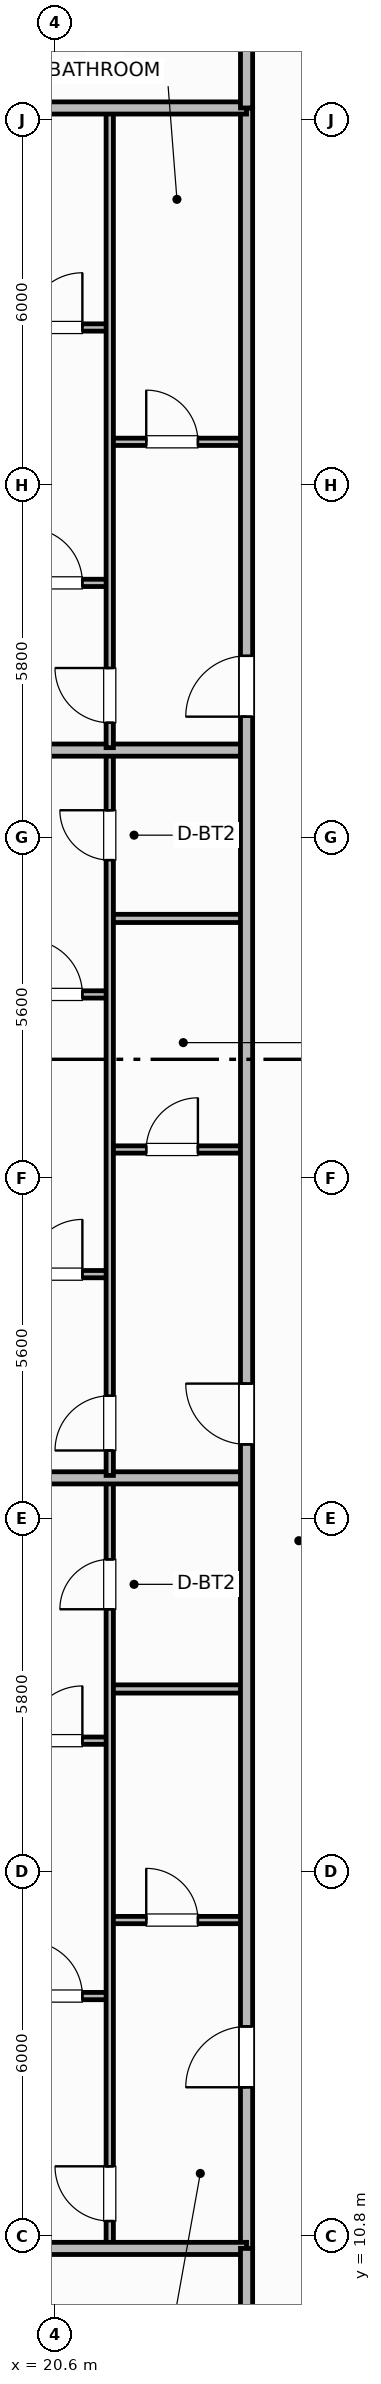
"""IFC4 building model, lengths in metres.
Left out: names, types, materials, properties, quantities, classifications, styles, units other than length and angle.
Written with IfcOpenShell. Run it as: python <this file> out.ifc"""

import sys

from ifc_helpers import new_model, si_unit, direction, frame, frame_2d, origin, place, context, subcontext, project, spatial, rectangle, extrude, element, fill, save


model = new_model("IFC4")
c1 = context("Model", 3, precision=1e-05, world=origin(), true_north=direction((0.0, 1.0)))
c2 = subcontext(c1, "Body", "Model", "MODEL_VIEW")
j1 = project(units=[si_unit("LENGTHUNIT", "METRE"), si_unit("PLANEANGLEUNIT", "RADIAN")], contexts=[c1])
p1 = place(None, origin())
s1 = spatial("IfcSite", under=j1, at=p1, CompositionType="ELEMENT")
p2 = place(p1, origin())
s2 = spatial("IfcBuilding", under=s1, at=p2, CompositionType="ELEMENT")
p3 = place(p2, frame((0.0, 0.0, 69.5)))
s3 = spatial("IfcBuildingStorey", under=s2, at=p3, CompositionType="ELEMENT", Elevation=69.5)
p4 = place(p3, frame((21.5, 16.0, 0.0), z_axis=(0.0, 0.0, 1.0), x_axis=(1.0, 0.0, 0.0)))
e1 = element("IfcWall", 1, at=p4, inside=s3, PredefinedType="PARTITIONING", context=c2, shape_type="SweptSolid", body=[
    extrude(rectangle(XDim=2.25, YDim=0.12, at=frame_2d((1.125, 0.0))), origin(), (0.0, 0.0, 1.0), 2.53),
])
p5 = place(p4, frame((0.6, 0.0, 0.0)))
e2 = element("IfcOpeningElement", 2, at=p5, cuts=e1, PredefinedType="OPENING", context=c2, shape_type="SweptSolid", body=[
    extrude(rectangle(XDim=0.85, YDim=2.1, at=frame_2d((0.425, 1.05))), frame((0.0, 0.07, 0.0), z_axis=(0.0, -1.0, 0.0), x_axis=(1.0, 0.0, 0.0)), (0.0, 0.0, 1.0), 0.14),
])
p6 = place(p3, frame((21.5, 19.8, 0.0), z_axis=(0.0, 0.0, 1.0), x_axis=(1.0, 0.0, 0.0)))
e3 = element("IfcWall", 3, at=p6, inside=s3, PredefinedType="PARTITIONING", context=c2, shape_type="SweptSolid", body=[
    extrude(rectangle(XDim=2.25, YDim=0.135, at=frame_2d((1.125, 0.0))), origin(), (0.0, 0.0, 1.0), 2.53),
])
p7 = place(p3, frame((14.57, 14.75, 0.0), z_axis=(0.0, 0.0, 1.0), x_axis=(1.0, 0.0, 0.0)))
e4 = element("IfcWall", 4, at=p7, inside=s3, PredefinedType="PARTITIONING", context=c2, shape_type="SweptSolid", body=[
    extrude(rectangle(XDim=6.93, YDim=0.12, at=frame_2d((3.465, 0.0))), origin(), (0.0, 0.0, 1.0), 2.53),
])
p8 = place(p7, frame((5.58, 0.0, 0.0)))
e5 = element("IfcOpeningElement", 5, at=p8, cuts=e4, PredefinedType="OPENING", context=c2, shape_type="SweptSolid", body=[
    extrude(rectangle(XDim=0.9, YDim=2.1, at=frame_2d((0.45, 1.05))), frame((0.0, 0.07, 0.0), z_axis=(0.0, -1.0, 0.0), x_axis=(1.0, 0.0, 0.0)), (0.0, 0.0, 1.0), 0.14),
])
p9 = place(p3, frame((14.57, 18.95, 0.0), z_axis=(0.0, 0.0, 1.0), x_axis=(1.0, 0.0, 0.0)))
e6 = element("IfcWall", 6, at=p9, inside=s3, PredefinedType="PARTITIONING", context=c2, shape_type="SweptSolid", body=[
    extrude(rectangle(XDim=6.93, YDim=0.12, at=frame_2d((3.465, 0.0))), origin(), (0.0, 0.0, 1.0), 2.53),
])
p10 = place(p9, frame((5.58, 0.0, 0.0)))
e7 = element("IfcOpeningElement", 7, at=p10, cuts=e6, PredefinedType="OPENING", context=c2, shape_type="SweptSolid", body=[
    extrude(rectangle(XDim=0.9, YDim=2.1, at=frame_2d((0.45, 1.05))), frame((0.0, 0.07, 0.0), z_axis=(0.0, -1.0, 0.0), x_axis=(1.0, 0.0, 0.0)), (0.0, 0.0, 1.0), 0.14),
])
p11 = place(p3, frame((21.5, 10.64, 0.0), z_axis=(0.0, 0.0, 1.0), x_axis=(0.0, 1.0, 0.0)))
e8 = element("IfcWall", 8, at=p11, inside=s3, PredefinedType="PARTITIONING", context=c2, shape_type="SweptSolid", body=[
    extrude(rectangle(XDim=12.592, YDim=0.12, at=frame_2d((6.296, 0.0))), origin(), (0.0, 0.0, 1.0), 2.53),
])
p12 = place(p11, frame((0.41, 0.0, 0.0)))
e9 = element("IfcOpeningElement", 9, at=p12, cuts=e8, PredefinedType="OPENING", context=c2, shape_type="SweptSolid", body=[
    extrude(rectangle(XDim=0.9, YDim=2.1, at=frame_2d((0.45, 1.05))), frame((0.0, 0.07, 0.0), z_axis=(0.0, -1.0, 0.0), x_axis=(1.0, 0.0, 0.0)), (0.0, 0.0, 1.0), 0.14),
])
p13 = place(p11, frame((10.471, 0.0, 0.0)))
e10 = element("IfcOpeningElement", 10, at=p13, cuts=e8, PredefinedType="OPENING", context=c2, shape_type="SweptSolid", body=[
    extrude(rectangle(XDim=0.82, YDim=2.08, at=frame_2d((0.41, 1.04))), frame((0.0, 0.07, 0.0), z_axis=(0.0, -1.0, 0.0), x_axis=(1.0, 0.0, 0.0)), (0.0, 0.0, 1.0), 0.14),
])
p14 = place(p3, frame((14.57, 23.272, 0.0), z_axis=(0.0, 0.0, 1.0), x_axis=(1.0, 0.0, 0.0)))
e11 = element("IfcWall", 11, at=p14, inside=s3, PredefinedType="PARTITIONING", context=c2, shape_type="SweptSolid", body=[
    extrude(rectangle(XDim=9.18, YDim=0.2, at=frame_2d((4.59, 0.0))), origin(), (0.0, 0.0, 1.0), 2.53),
])
p15 = place(p3, frame((21.5, 28.672, 0.0), z_axis=(0.0, 0.0, 1.0), x_axis=(1.0, 0.0, 0.0)))
e12 = element("IfcWall", 12, at=p15, inside=s3, PredefinedType="PARTITIONING", context=c2, shape_type="SweptSolid", body=[
    extrude(rectangle(XDim=2.25, YDim=0.12, at=frame_2d((1.125, 0.0))), origin(), (0.0, 0.0, 1.0), 2.53),
])
p16 = place(p15, frame((0.6, 0.0, 0.0)))
e13 = element("IfcOpeningElement", 13, at=p16, cuts=e12, PredefinedType="OPENING", context=c2, shape_type="SweptSolid", body=[
    extrude(rectangle(XDim=0.85, YDim=2.1, at=frame_2d((0.425, 1.05))), frame((0.0, 0.07, 0.0), z_axis=(0.0, -1.0, 0.0), x_axis=(1.0, 0.0, 0.0)), (0.0, 0.0, 1.0), 0.14),
])
p17 = place(p3, frame((21.5, 32.472, 0.0), z_axis=(0.0, 0.0, 1.0), x_axis=(1.0, 0.0, 0.0)))
e14 = element("IfcWall", 14, at=p17, inside=s3, PredefinedType="PARTITIONING", context=c2, shape_type="SweptSolid", body=[
    extrude(rectangle(XDim=2.25, YDim=0.135, at=frame_2d((1.125, 0.0))), origin(), (0.0, 0.0, 1.0), 2.53),
])
p18 = place(p3, frame((15.181, 26.622, 0.0), z_axis=(0.0, 0.0, 1.0), x_axis=(1.0, 0.0, 0.0)))
e15 = element("IfcWall", 15, at=p18, inside=s3, PredefinedType="PARTITIONING", context=c2, shape_type="SweptSolid", body=[
    extrude(rectangle(XDim=6.319, YDim=0.12, at=frame_2d((3.159, 0.0))), origin(), (0.0, 0.0, 1.0), 2.53),
])
p19 = place(p18, frame((4.969, 0.0, 0.0)))
e16 = element("IfcOpeningElement", 16, at=p19, cuts=e15, PredefinedType="OPENING", context=c2, shape_type="SweptSolid", body=[
    extrude(rectangle(XDim=0.9, YDim=2.1, at=frame_2d((0.45, 1.05))), frame((0.0, 0.07, 0.0), z_axis=(0.0, -1.0, 0.0), x_axis=(1.0, 0.0, 0.0)), (0.0, 0.0, 1.0), 0.14),
])
p20 = place(p3, frame((15.259, 31.222, 0.0), z_axis=(0.0, 0.0, 1.0), x_axis=(1.0, 0.0, 0.0)))
e17 = element("IfcWall", 17, at=p20, inside=s3, PredefinedType="PARTITIONING", context=c2, shape_type="SweptSolid", body=[
    extrude(rectangle(XDim=6.241, YDim=0.12, at=frame_2d((3.121, 0.0))), origin(), (0.0, 0.0, 1.0), 2.53),
])
p21 = place(p20, frame((4.891, 0.0, 0.0)))
e18 = element("IfcOpeningElement", 18, at=p21, cuts=e17, PredefinedType="OPENING", context=c2, shape_type="SweptSolid", body=[
    extrude(rectangle(XDim=0.9, YDim=2.1, at=frame_2d((0.45, 1.05))), frame((0.0, 0.07, 0.0), z_axis=(0.0, -1.0, 0.0), x_axis=(1.0, 0.0, 0.0)), (0.0, 0.0, 1.0), 0.14),
])
p22 = place(p3, frame((21.5, 23.312, 0.0), z_axis=(0.0, 0.0, 1.0), x_axis=(0.0, 1.0, 0.0)))
e19 = element("IfcWall", 19, at=p22, inside=s3, PredefinedType="PARTITIONING", context=c2, shape_type="SweptSolid", body=[
    extrude(rectangle(XDim=11.888, YDim=0.12, at=frame_2d((5.944, 0.0))), origin(), (0.0, 0.0, 1.0), 2.53),
])
p23 = place(p22, frame((0.41, 0.0, 0.0)))
e20 = element("IfcOpeningElement", 20, at=p23, cuts=e19, PredefinedType="OPENING", context=c2, shape_type="SweptSolid", body=[
    extrude(rectangle(XDim=0.9, YDim=2.1, at=frame_2d((0.45, 1.05))), frame((0.0, 0.07, 0.0), z_axis=(0.0, -1.0, 0.0), x_axis=(1.0, 0.0, 0.0)), (0.0, 0.0, 1.0), 0.14),
])
p24 = place(p22, frame((10.119, 0.0, 0.0)))
e21 = element("IfcOpeningElement", 21, at=p24, cuts=e19, PredefinedType="OPENING", context=c2, shape_type="SweptSolid", body=[
    extrude(rectangle(XDim=0.82, YDim=2.08, at=frame_2d((0.41, 1.04))), frame((0.0, 0.07, 0.0), z_axis=(0.0, -1.0, 0.0), x_axis=(1.0, 0.0, 0.0)), (0.0, 0.0, 1.0), 0.14),
])
p25 = place(p3, frame((14.57, 35.24, 0.0), z_axis=(0.0, 0.0, 1.0), x_axis=(1.0, 0.0, 0.0)))
e22 = element("IfcWall", 22, at=p25, inside=s3, PredefinedType="PARTITIONING", context=c2, shape_type="SweptSolid", body=[
    extrude(rectangle(XDim=9.18, YDim=0.2, at=frame_2d((4.59, 0.0))), origin(), (0.0, 0.0, 1.0), 2.53),
])
p26 = place(p3, frame((21.5, 40.31, 0.0), z_axis=(0.0, 0.0, 1.0), x_axis=(1.0, 0.0, 0.0)))
e23 = element("IfcWall", 23, at=p26, inside=s3, PredefinedType="PARTITIONING", context=c2, shape_type="SweptSolid", body=[
    extrude(rectangle(XDim=2.25, YDim=0.12, at=frame_2d((1.125, 0.0))), origin(), (0.0, 0.0, 1.0), 2.53),
])
p27 = place(p26, frame((0.6, 0.0, 0.0)))
e24 = element("IfcOpeningElement", 24, at=p27, cuts=e23, PredefinedType="OPENING", context=c2, shape_type="SweptSolid", body=[
    extrude(rectangle(XDim=0.85, YDim=2.1, at=frame_2d((0.425, 1.05))), frame((0.0, 0.07, 0.0), z_axis=(0.0, -1.0, 0.0), x_axis=(1.0, 0.0, 0.0)), (0.0, 0.0, 1.0), 0.14),
])
p28 = place(p3, frame((14.57, 37.99, 0.0), z_axis=(0.0, 0.0, 1.0), x_axis=(1.0, 0.0, 0.0)))
e25 = element("IfcWall", 25, at=p28, inside=s3, PredefinedType="PARTITIONING", context=c2, shape_type="SweptSolid", body=[
    extrude(rectangle(XDim=6.93, YDim=0.12, at=frame_2d((3.465, 0.0))), origin(), (0.0, 0.0, 1.0), 2.53),
])
p29 = place(p28, frame((5.58, 0.0, 0.0)))
e26 = element("IfcOpeningElement", 26, at=p29, cuts=e25, PredefinedType="OPENING", context=c2, shape_type="SweptSolid", body=[
    extrude(rectangle(XDim=0.9, YDim=2.1, at=frame_2d((0.45, 1.05))), frame((0.0, 0.07, 0.0), z_axis=(0.0, -1.0, 0.0), x_axis=(1.0, 0.0, 0.0)), (0.0, 0.0, 1.0), 0.14),
])
p30 = place(p3, frame((14.57, 42.19, 0.0), z_axis=(0.0, 0.0, 1.0), x_axis=(1.0, 0.0, 0.0)))
e27 = element("IfcWall", 27, at=p30, inside=s3, PredefinedType="PARTITIONING", context=c2, shape_type="SweptSolid", body=[
    extrude(rectangle(XDim=6.93, YDim=0.12, at=frame_2d((3.465, 0.0))), origin(), (0.0, 0.0, 1.0), 2.53),
])
p31 = place(p30, frame((5.58, 0.0, 0.0)))
e28 = element("IfcOpeningElement", 28, at=p31, cuts=e27, PredefinedType="OPENING", context=c2, shape_type="SweptSolid", body=[
    extrude(rectangle(XDim=0.9, YDim=2.1, at=frame_2d((0.45, 1.05))), frame((0.0, 0.07, 0.0), z_axis=(0.0, -1.0, 0.0), x_axis=(1.0, 0.0, 0.0)), (0.0, 0.0, 1.0), 0.14),
])
p32 = place(p3, frame((21.5, 35.28, 0.0), z_axis=(0.0, 0.0, 1.0), x_axis=(0.0, 1.0, 0.0)))
e29 = element("IfcWall", 29, at=p32, inside=s3, PredefinedType="PARTITIONING", context=c2, shape_type="SweptSolid", body=[
    extrude(rectangle(XDim=10.48, YDim=0.12, at=frame_2d((5.24, 0.0))), origin(), (0.0, 0.0, 1.0), 2.53),
])
p33 = place(p32, frame((0.41, 0.0, 0.0)))
e30 = element("IfcOpeningElement", 30, at=p33, cuts=e29, PredefinedType="OPENING", context=c2, shape_type="SweptSolid", body=[
    extrude(rectangle(XDim=0.9, YDim=2.1, at=frame_2d((0.45, 1.05))), frame((0.0, 0.07, 0.0), z_axis=(0.0, -1.0, 0.0), x_axis=(1.0, 0.0, 0.0)), (0.0, 0.0, 1.0), 0.14),
])
p34 = place(p3, frame((23.75, 10.6, 0.0), z_axis=(0.0, 0.0, 1.0), x_axis=(0.0, 1.0, 0.0)))
e31 = element("IfcWall", 31, at=p34, inside=s3, PredefinedType="PARTITIONING", context=c2, shape_type="SweptSolid", body=[
    extrude(rectangle(XDim=35.2, YDim=0.2, at=frame_2d((17.6, 0.0))), origin(), (0.0, 0.0, 1.0), 2.53),
])
p35 = place(p34, frame((2.65, 0.0, 0.0)))
e32 = element("IfcOpeningElement", 32, at=p35, cuts=e31, PredefinedType="OPENING", context=c2, shape_type="SweptSolid", body=[
    extrude(rectangle(XDim=1.0, YDim=2.15, at=frame_2d((0.5, 1.075))), frame((0.0, 0.11, 0.0), z_axis=(0.0, -1.0, 0.0), x_axis=(1.0, 0.0, 0.0)), (0.0, 0.0, 1.0), 0.22),
])
p36 = place(p34, frame((13.222, 0.0, 0.0)))
e33 = element("IfcOpeningElement", 33, at=p36, cuts=e31, PredefinedType="OPENING", context=c2, shape_type="SweptSolid", body=[
    extrude(rectangle(XDim=1.0, YDim=2.15, at=frame_2d((0.5, 1.075))), frame((0.0, 0.11, 0.0), z_axis=(0.0, -1.0, 0.0), x_axis=(1.0, 0.0, 0.0)), (0.0, 0.0, 1.0), 0.22),
])
p37 = place(p34, frame((25.19, 0.0, 0.0)))
e34 = element("IfcOpeningElement", 34, at=p37, cuts=e31, PredefinedType="OPENING", context=c2, shape_type="SweptSolid", body=[
    extrude(rectangle(XDim=1.0, YDim=2.15, at=frame_2d((0.5, 1.075))), frame((0.0, 0.11, 0.0), z_axis=(0.0, -1.0, 0.0), x_axis=(1.0, 0.0, 0.0)), (0.0, 0.0, 1.0), 0.22),
])
for number, where, z_axis, x_axis in (
    (35, (14.99, 10.6, 0.0), (0.0, 0.0, 1.0), (1.0, 0.0, 0.0)),
    (36, (14.99, 45.8, 0.0), (0.0, 0.0, 1.0), (1.0, 0.0, 0.0)),
):
    element("IfcWall", number, at=place(p3, frame(where, z_axis=z_axis, x_axis=x_axis)), inside=s3, PredefinedType="PARTITIONING", context=c2, shape_type="SweptSolid", body=[
        extrude(rectangle(XDim=8.76, YDim=0.2, at=frame_2d((4.38, 0.0))), origin(), (0.0, 0.0, 1.0), 2.53),
    ])
p38 = place(p3, frame((23.75, 4.97, 0.0), z_axis=(0.0, 0.0, 1.0), x_axis=(0.0, 1.0, 0.0)))
e37 = element("IfcWall", 37, at=p38, inside=s3, PredefinedType="PARTITIONING", context=c2, shape_type="SweptSolid", body=[
    extrude(rectangle(XDim=5.63, YDim=0.2, at=frame_2d((2.815, 0.0))), origin(), (0.0, 0.0, 1.0), 2.53),
])
p39 = place(p3, frame((23.75, 45.8, 0.0), z_axis=(0.0, 0.0, 1.0), x_axis=(0.0, 1.0, 0.0)))
e38 = element("IfcWall", 38, at=p39, inside=s3, PredefinedType="PARTITIONING", context=c2, shape_type="SweptSolid", body=[
    extrude(rectangle(XDim=5.63, YDim=0.2, at=frame_2d((2.815, 0.0))), origin(), (0.0, 0.0, 1.0), 2.53),
])
p40 = place(p5, origin())
e39 = element("IfcDoor", 39, at=p40, inside=s3, OperationType="SINGLE_SWING_LEFT", PredefinedType="DOOR", context=c2, shape_type="SweptSolid", body=[
    extrude(rectangle(XDim=0.85, YDim=2.1, at=frame_2d((0.425, 1.05))), frame((0.0, 0.025, 0.0), z_axis=(0.0, -1.0, 0.0), x_axis=(1.0, 0.0, 0.0)), (0.0, 0.0, 1.0), 0.05),
])
fill(e2, e39)
p41 = place(p8, origin())
e40 = element("IfcDoor", 40, at=p41, inside=s3, OperationType="SINGLE_SWING_LEFT", PredefinedType="DOOR", context=c2, shape_type="SweptSolid", body=[
    extrude(rectangle(XDim=0.9, YDim=2.1, at=frame_2d((0.45, 1.05))), frame((0.0, 0.025, 0.0), z_axis=(0.0, -1.0, 0.0), x_axis=(1.0, 0.0, 0.0)), (0.0, 0.0, 1.0), 0.05),
])
fill(e5, e40)
p42 = place(p10, origin())
e41 = element("IfcDoor", 41, at=p42, inside=s3, OperationType="SINGLE_SWING_RIGHT", PredefinedType="DOOR", context=c2, shape_type="SweptSolid", body=[
    extrude(rectangle(XDim=0.9, YDim=2.1, at=frame_2d((0.45, 1.05))), frame((0.0, 0.025, 0.0), z_axis=(0.0, -1.0, 0.0), x_axis=(1.0, 0.0, 0.0)), (0.0, 0.0, 1.0), 0.05),
])
fill(e7, e41)
p43 = place(p12, origin())
e42 = element("IfcDoor", 42, at=p43, inside=s3, OperationType="SINGLE_SWING_RIGHT", PredefinedType="DOOR", context=c2, shape_type="SweptSolid", body=[
    extrude(rectangle(XDim=0.9, YDim=2.1, at=frame_2d((0.45, 1.05))), frame((0.0, 0.025, 0.0), z_axis=(0.0, -1.0, 0.0), x_axis=(1.0, 0.0, 0.0)), (0.0, 0.0, 1.0), 0.05),
])
fill(e9, e42)
p44 = place(p13, origin())
e43 = element("IfcDoor", 43, at=p44, inside=s3, OperationType="SINGLE_SWING_LEFT", PredefinedType="DOOR", context=c2, shape_type="SweptSolid", body=[
    extrude(rectangle(XDim=0.82, YDim=2.08, at=frame_2d((0.41, 1.04))), frame((0.0, 0.025, 0.0), z_axis=(0.0, -1.0, 0.0), x_axis=(1.0, 0.0, 0.0)), (0.0, 0.0, 1.0), 0.05),
])
fill(e10, e43)
p45 = place(p16, origin())
e44 = element("IfcDoor", 44, at=p45, inside=s3, OperationType="SINGLE_SWING_RIGHT", PredefinedType="DOOR", context=c2, shape_type="SweptSolid", body=[
    extrude(rectangle(XDim=0.85, YDim=2.1, at=frame_2d((0.425, 1.05))), frame((0.0, 0.025, 0.0), z_axis=(0.0, -1.0, 0.0), x_axis=(1.0, 0.0, 0.0)), (0.0, 0.0, 1.0), 0.05),
])
fill(e13, e44)
p46 = place(p19, origin())
e45 = element("IfcDoor", 45, at=p46, inside=s3, OperationType="SINGLE_SWING_RIGHT", PredefinedType="DOOR", context=c2, shape_type="SweptSolid", body=[
    extrude(rectangle(XDim=0.9, YDim=2.1, at=frame_2d((0.45, 1.05))), frame((0.0, 0.025, 0.0), z_axis=(0.0, -1.0, 0.0), x_axis=(1.0, 0.0, 0.0)), (0.0, 0.0, 1.0), 0.05),
])
fill(e16, e45)
p47 = place(p21, origin())
e46 = element("IfcDoor", 46, at=p47, inside=s3, OperationType="SINGLE_SWING_LEFT", PredefinedType="DOOR", context=c2, shape_type="SweptSolid", body=[
    extrude(rectangle(XDim=0.9, YDim=2.1, at=frame_2d((0.45, 1.05))), frame((0.0, 0.025, 0.0), z_axis=(0.0, -1.0, 0.0), x_axis=(1.0, 0.0, 0.0)), (0.0, 0.0, 1.0), 0.05),
])
fill(e18, e46)
p48 = place(p23, origin())
e47 = element("IfcDoor", 47, at=p48, inside=s3, OperationType="SINGLE_SWING_LEFT", PredefinedType="DOOR", context=c2, shape_type="SweptSolid", body=[
    extrude(rectangle(XDim=0.9, YDim=2.1, at=frame_2d((0.45, 1.05))), frame((0.0, 0.025, 0.0), z_axis=(0.0, -1.0, 0.0), x_axis=(1.0, 0.0, 0.0)), (0.0, 0.0, 1.0), 0.05),
])
fill(e20, e47)
p49 = place(p24, origin())
e48 = element("IfcDoor", 48, at=p49, inside=s3, OperationType="SINGLE_SWING_RIGHT", PredefinedType="DOOR", context=c2, shape_type="SweptSolid", body=[
    extrude(rectangle(XDim=0.82, YDim=2.08, at=frame_2d((0.41, 1.04))), frame((0.0, 0.025, 0.0), z_axis=(0.0, -1.0, 0.0), x_axis=(1.0, 0.0, 0.0)), (0.0, 0.0, 1.0), 0.05),
])
fill(e21, e48)
p50 = place(p27, origin())
e49 = element("IfcDoor", 49, at=p50, inside=s3, OperationType="SINGLE_SWING_LEFT", PredefinedType="DOOR", context=c2, shape_type="SweptSolid", body=[
    extrude(rectangle(XDim=0.85, YDim=2.1, at=frame_2d((0.425, 1.05))), frame((0.0, 0.025, 0.0), z_axis=(0.0, -1.0, 0.0), x_axis=(1.0, 0.0, 0.0)), (0.0, 0.0, 1.0), 0.05),
])
fill(e24, e49)
p51 = place(p29, origin())
e50 = element("IfcDoor", 50, at=p51, inside=s3, OperationType="SINGLE_SWING_LEFT", PredefinedType="DOOR", context=c2, shape_type="SweptSolid", body=[
    extrude(rectangle(XDim=0.9, YDim=2.1, at=frame_2d((0.45, 1.05))), frame((0.0, 0.025, 0.0), z_axis=(0.0, -1.0, 0.0), x_axis=(1.0, 0.0, 0.0)), (0.0, 0.0, 1.0), 0.05),
])
fill(e26, e50)
p52 = place(p31, origin())
e51 = element("IfcDoor", 51, at=p52, inside=s3, OperationType="SINGLE_SWING_RIGHT", PredefinedType="DOOR", context=c2, shape_type="SweptSolid", body=[
    extrude(rectangle(XDim=0.9, YDim=2.1, at=frame_2d((0.45, 1.05))), frame((0.0, 0.025, 0.0), z_axis=(0.0, -1.0, 0.0), x_axis=(1.0, 0.0, 0.0)), (0.0, 0.0, 1.0), 0.05),
])
fill(e28, e51)
p53 = place(p33, origin())
e52 = element("IfcDoor", 52, at=p53, inside=s3, OperationType="SINGLE_SWING_RIGHT", PredefinedType="DOOR", context=c2, shape_type="SweptSolid", body=[
    extrude(rectangle(XDim=0.9, YDim=2.1, at=frame_2d((0.45, 1.05))), frame((0.0, 0.025, 0.0), z_axis=(0.0, -1.0, 0.0), x_axis=(1.0, 0.0, 0.0)), (0.0, 0.0, 1.0), 0.05),
])
fill(e30, e52)
p54 = place(p35, origin())
e53 = element("IfcDoor", 53, at=p54, inside=s3, OperationType="SINGLE_SWING_LEFT", PredefinedType="DOOR", context=c2, shape_type="SweptSolid", body=[
    extrude(rectangle(XDim=1.0, YDim=2.15, at=frame_2d((0.5, 1.075))), frame((0.0, 0.025, 0.0), z_axis=(0.0, -1.0, 0.0), x_axis=(1.0, 0.0, 0.0)), (0.0, 0.0, 1.0), 0.05),
])
fill(e32, e53)
p55 = place(p36, origin())
e54 = element("IfcDoor", 54, at=p55, inside=s3, OperationType="SINGLE_SWING_RIGHT", PredefinedType="DOOR", context=c2, shape_type="SweptSolid", body=[
    extrude(rectangle(XDim=1.0, YDim=2.15, at=frame_2d((0.5, 1.075))), frame((0.0, 0.025, 0.0), z_axis=(0.0, -1.0, 0.0), x_axis=(1.0, 0.0, 0.0)), (0.0, 0.0, 1.0), 0.05),
])
fill(e33, e54)
p56 = place(p37, origin())
e55 = element("IfcDoor", 55, at=p56, inside=s3, OperationType="SINGLE_SWING_LEFT", PredefinedType="DOOR", context=c2, shape_type="SweptSolid", body=[
    extrude(rectangle(XDim=1.0, YDim=2.15, at=frame_2d((0.5, 1.075))), frame((0.0, 0.025, 0.0), z_axis=(0.0, -1.0, 0.0), x_axis=(1.0, 0.0, 0.0)), (0.0, 0.0, 1.0), 0.05),
])
fill(e34, e55)
save(model, sys.argv[1])
